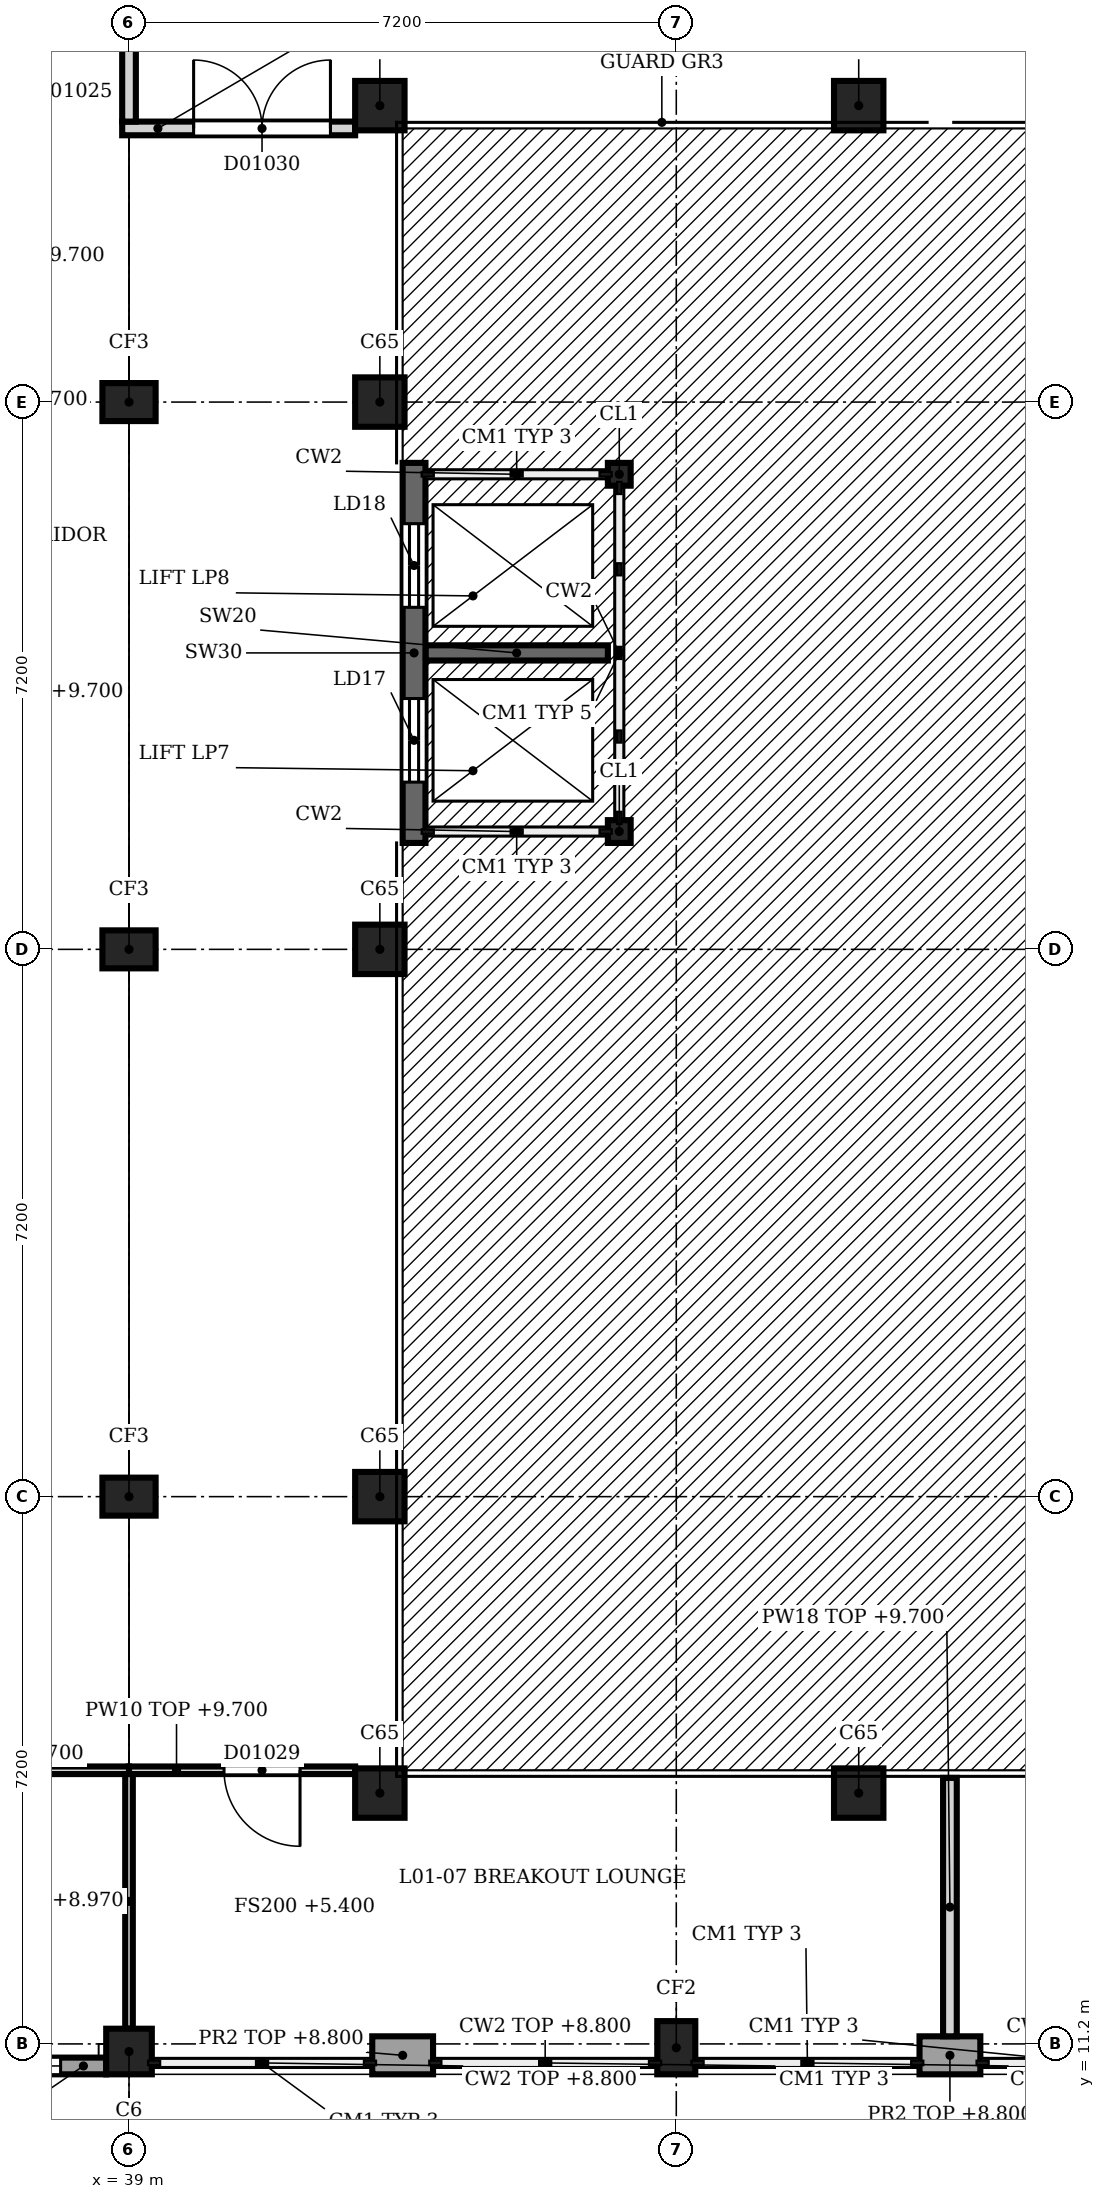
"""IFC4 building model, lengths in metres.
Left out: names, types, materials, properties, quantities, classifications, styles, units other than length and angle.
Written with IfcOpenShell. Run it as: python <this file> out.ifc"""

import sys

from ifc_helpers import new_model, si_unit, direction, frame, frame_2d, origin, origin_2d, place, context, subcontext, project, spatial, rectangle, extrude, element, fill, save


model = new_model("IFC4")
c1 = context("Model", 3, precision=1e-05, world=origin(), true_north=direction((0.0, 1.0)))
c2 = subcontext(c1, "Body", "Model", "MODEL_VIEW")
j1 = project(units=[si_unit("LENGTHUNIT", "METRE"), si_unit("PLANEANGLEUNIT", "RADIAN")], contexts=[c1])
p1 = place(None, origin())
s1 = spatial("IfcSite", under=j1, at=p1, CompositionType="ELEMENT")
p2 = place(p1, origin())
s2 = spatial("IfcBuilding", under=s1, at=p2, CompositionType="ELEMENT")
p3 = place(p2, frame((0.0, 0.0, 5.4)))
s3 = spatial("IfcBuildingStorey", under=s2, at=p3, CompositionType="ELEMENT", Elevation=5.4)
p4 = place(p3, frame((39.0, 11.1, 0.0), z_axis=(0.0, 0.0, 1.0), x_axis=(1.0, 0.0, 0.0)))
e1 = element("IfcColumn", 1, at=p4, inside=s3, PredefinedType="COLUMN", context=c2, shape_type="SweptSolid", body=[
    extrude(rectangle(XDim=0.6, YDim=0.6, at=origin_2d()), origin(), (0.0, 0.0, 1.0), 4.5),
])
for number, where, z_axis, x_axis in (
    (2, (39.0, 18.4, 0.0), (0.0, 0.0, 1.0), (1.0, 0.0, 0.0)),
    (3, (39.0, 25.6, 0.0), (0.0, 0.0, 1.0), (1.0, 0.0, 0.0)),
    (4, (39.0, 32.8, 0.0), (0.0, 0.0, 1.0), (1.0, 0.0, 0.0)),
):
    element("IfcColumn", number, at=place(p3, frame(where, z_axis=z_axis, x_axis=x_axis)), inside=s3, PredefinedType="COLUMN", context=c2, shape_type="SweptSolid", body=[
        extrude(rectangle(XDim=0.7, YDim=0.5, at=origin_2d()), origin(), (0.0, 0.0, 1.0), 4.5),
    ])
p5 = place(p3, frame((46.2, 11.15, 0.0), z_axis=(0.0, 0.0, 1.0), x_axis=(1.0, 0.0, 0.0)))
e5 = element("IfcColumn", 5, at=p5, inside=s3, PredefinedType="COLUMN", context=c2, shape_type="SweptSolid", body=[
    extrude(rectangle(XDim=0.5, YDim=0.7, at=origin_2d()), origin(), (0.0, 0.0, 1.0), 4.5),
])
for number, where, z_axis, x_axis in (
    (6, (42.3, 14.5, 0.0), (0.0, 0.0, 1.0), (1.0, 0.0, 0.0)),
    (7, (42.3, 18.4, 0.0), (0.0, 0.0, 1.0), (1.0, 0.0, 0.0)),
    (8, (42.3, 25.6, 0.0), (0.0, 0.0, 1.0), (1.0, 0.0, 0.0)),
    (9, (42.3, 32.8, 0.0), (0.0, 0.0, 1.0), (1.0, 0.0, 0.0)),
    (10, (42.3, 36.7, 0.0), (0.0, 0.0, 1.0), (1.0, 0.0, 0.0)),
    (11, (48.6, 14.5, 0.0), (0.0, 0.0, 1.0), (1.0, 0.0, 0.0)),
    (12, (48.6, 36.7, 0.0), (0.0, 0.0, 1.0), (1.0, 0.0, 0.0)),
):
    element("IfcColumn", number, at=place(p3, frame(where, z_axis=z_axis, x_axis=x_axis)), inside=s3, PredefinedType="COLUMN", context=c2, shape_type="SweptSolid", body=[
        extrude(rectangle(XDim=0.65, YDim=0.65, at=origin_2d()), origin(), (0.0, 0.0, 1.0), 4.5),
    ])
for number, where, z_axis, x_axis in (
    (13, (50.2, 11.05, 0.0), (0.0, 0.0, 1.0), (-1.0, 0.0, 0.0)),
    (14, (43.0, 11.05, 0.0), (0.0, 0.0, 1.0), (-1.0, 0.0, 0.0)),
):
    element("IfcWall", number, at=place(p3, frame(where, z_axis=z_axis, x_axis=x_axis)), inside=s3, PredefinedType="SOLIDWALL", context=c2, shape_type="SweptSolid", body=[
        extrude(rectangle(XDim=0.8, YDim=0.5, at=frame_2d((0.4, 0.0))), origin(), (0.0, 0.0, 1.0), 3.4),
    ])
p6 = place(p3, frame((38.7, 10.91, 0.0), z_axis=(0.0, 0.0, 1.0), x_axis=(-1.0, 0.0, 0.0)))
e15 = element("IfcWall", 15, at=p6, inside=s3, PredefinedType="SOLIDWALL", context=c2, shape_type="SweptSolid", body=[
    extrude(rectangle(XDim=2.9, YDim=0.22, at=frame_2d((1.45, 0.0))), origin(), (0.0, 0.0, 1.0), 3.4),
])
p7 = place(p6, frame((0.6, 0.0, 0.9)))
e16 = element("IfcOpeningElement", 16, at=p7, cuts=e15, PredefinedType="OPENING", context=c2, shape_type="SweptSolid", body=[
    extrude(rectangle(XDim=1.8, YDim=2.4, at=frame_2d((0.9, 1.2))), frame((0.0, 0.12, 0.0), z_axis=(0.0, -1.0, 0.0), x_axis=(1.0, 0.0, 0.0)), (0.0, 0.0, 1.0), 0.24),
])
p8 = place(p3, frame((35.4, 14.8, 0.0), z_axis=(0.0, 0.0, 1.0), x_axis=(1.0, 0.0, 0.0)))
e17 = element("IfcWall", 17, at=p8, inside=s3, PredefinedType="PARTITIONING", context=c2, shape_type="SweptSolid", body=[
    extrude(rectangle(XDim=3.6, YDim=0.1, at=frame_2d((1.8, 0.0))), origin(), (0.0, 0.0, 1.0), 4.3),
])
p9 = place(p3, frame((41.975, 14.8, 0.0), z_axis=(0.0, 0.0, 1.0), x_axis=(-1.0, 0.0, 0.0)))
e18 = element("IfcWall", 18, at=p9, inside=s3, PredefinedType="PARTITIONING", context=c2, shape_type="SweptSolid", body=[
    extrude(rectangle(XDim=2.975, YDim=0.1, at=frame_2d((1.488, 0.0))), origin(), (0.0, 0.0, 1.0), 4.3),
])
p10 = place(p9, frame((0.725, 0.0, 0.0)))
e19 = element("IfcOpeningElement", 19, at=p10, cuts=e18, PredefinedType="OPENING", context=c2, shape_type="SweptSolid", body=[
    extrude(rectangle(XDim=1.0, YDim=2.1, at=frame_2d((0.5, 1.05))), frame((0.0, 0.06, 0.0), z_axis=(0.0, -1.0, 0.0), x_axis=(1.0, 0.0, 0.0)), (0.0, 0.0, 1.0), 0.12),
])
p11 = place(p3, frame((41.975, 36.4, 0.0), z_axis=(0.0, 0.0, 1.0), x_axis=(-1.0, 0.0, 0.0)))
e20 = element("IfcWall", 20, at=p11, inside=s3, PredefinedType="PARTITIONING", context=c2, shape_type="SweptSolid", body=[
    extrude(rectangle(XDim=3.065, YDim=0.18, at=frame_2d((1.533, 0.0))), origin(), (0.0, 0.0, 1.0), 4.3),
])
p12 = place(p11, frame((0.325, 0.0, 0.0)))
e21 = element("IfcOpeningElement", 21, at=p12, cuts=e20, PredefinedType="OPENING", context=c2, shape_type="SweptSolid", body=[
    extrude(rectangle(XDim=1.8, YDim=2.1, at=frame_2d((0.9, 1.05))), frame((0.0, 0.1, 0.0), z_axis=(0.0, -1.0, 0.0), x_axis=(1.0, 0.0, 0.0)), (0.0, 0.0, 1.0), 0.2),
])
p13 = place(p3, frame((39.0, 11.4, 0.0), z_axis=(0.0, 0.0, 1.0), x_axis=(0.0, 1.0, 0.0)))
e22 = element("IfcWall", 22, at=p13, inside=s3, PredefinedType="PARTITIONING", context=c2, shape_type="SweptSolid", body=[
    extrude(rectangle(XDim=3.35, YDim=0.1, at=frame_2d((1.675, 0.0))), origin(), (0.0, 0.0, 1.0), 3.57),
])
p14 = place(p3, frame((39.0, 36.49, 0.0), z_axis=(0.0, 0.0, 1.0), x_axis=(0.0, 1.0, 0.0)))
e23 = element("IfcWall", 23, at=p14, inside=s3, PredefinedType="PARTITIONING", context=c2, shape_type="SweptSolid", body=[
    extrude(rectangle(XDim=3.31, YDim=0.18, at=frame_2d((1.655, 0.0))), origin(), (0.0, 0.0, 1.0), 3.57),
])
p15 = place(p3, frame((49.8, 11.3, 0.0), z_axis=(0.0, 0.0, 1.0), x_axis=(0.0, 1.0, 0.0)))
e24 = element("IfcWall", 24, at=p15, inside=s3, PredefinedType="PARTITIONING", context=c2, shape_type="SweptSolid", body=[
    extrude(rectangle(XDim=3.4, YDim=0.18, at=frame_2d((1.7, 0.0))), origin(), (0.0, 0.0, 1.0), 4.3),
])
p16 = place(p3, frame((42.75, 27.0, 0.0), z_axis=(0.0, 0.0, 1.0), x_axis=(0.0, 1.0, 0.0)))
e25 = element("IfcWall", 25, at=p16, inside=s3, PredefinedType="SHEAR", context=c2, shape_type="SweptSolid", body=[
    extrude(rectangle(XDim=5.0, YDim=0.3, at=frame_2d((2.5, 0.0))), origin(), (0.0, 0.0, 1.0), 4.5),
])
p17 = place(p16, frame((0.8, 0.0, 0.0)))
e26 = element("IfcOpeningElement", 26, at=p17, cuts=e25, PredefinedType="OPENING", context=c2, shape_type="SweptSolid", body=[
    extrude(rectangle(XDim=1.1, YDim=2.1, at=frame_2d((0.55, 1.05))), frame((0.0, 0.16, 0.0), z_axis=(0.0, -1.0, 0.0), x_axis=(1.0, 0.0, 0.0)), (0.0, 0.0, 1.0), 0.32),
])
p18 = place(p16, frame((3.1, 0.0, 0.0)))
e27 = element("IfcOpeningElement", 27, at=p18, cuts=e25, PredefinedType="OPENING", context=c2, shape_type="SweptSolid", body=[
    extrude(rectangle(XDim=1.1, YDim=2.1, at=frame_2d((0.55, 1.05))), frame((0.0, 0.16, 0.0), z_axis=(0.0, -1.0, 0.0), x_axis=(1.0, 0.0, 0.0)), (0.0, 0.0, 1.0), 0.32),
])
p19 = place(p3, frame((42.9, 29.5, 0.0), z_axis=(0.0, 0.0, 1.0), x_axis=(1.0, 0.0, 0.0)))
e28 = element("IfcWall", 28, at=p19, inside=s3, PredefinedType="SHEAR", context=c2, shape_type="SweptSolid", body=[
    extrude(rectangle(XDim=2.4, YDim=0.2, at=frame_2d((1.2, 0.0))), origin(), (0.0, 0.0, 1.0), 4.5),
])
for number, where, z_axis, x_axis in (
    (29, (45.45, 27.15, 0.0), (0.0, 0.0, 1.0), (1.0, 0.0, 0.0)),
    (30, (45.45, 31.85, 0.0), (0.0, 0.0, 1.0), (1.0, 0.0, 0.0)),
):
    element("IfcColumn", number, at=place(p3, frame(where, z_axis=z_axis, x_axis=x_axis)), inside=s3, PredefinedType="COLUMN", context=c2, shape_type="SweptSolid", body=[
        extrude(rectangle(XDim=0.3, YDim=0.3, at=origin_2d()), origin(), (0.0, 0.0, 1.0), 4.5),
    ])
p20 = place(p7, origin())
e31 = element("IfcWindow", 31, at=p20, inside=s3, PartitioningType="SINGLE_PANEL", PredefinedType="WINDOW", context=c2, shape_type="SweptSolid", body=[
    extrude(rectangle(XDim=1.8, YDim=2.4, at=frame_2d((0.9, 1.2))), frame((0.0, 0.03, 0.0), z_axis=(0.0, -1.0, 0.0), x_axis=(1.0, 0.0, 0.0)), (0.0, 0.0, 1.0), 0.06),
])
fill(e16, e31)
p21 = place(p10, origin())
e32 = element("IfcDoor", 32, at=p21, inside=s3, OperationType="SINGLE_SWING_LEFT", PredefinedType="DOOR", context=c2, shape_type="SweptSolid", body=[
    extrude(rectangle(XDim=1.0, YDim=2.1, at=frame_2d((0.5, 1.05))), frame((0.0, 0.025, 0.0), z_axis=(0.0, -1.0, 0.0), x_axis=(1.0, 0.0, 0.0)), (0.0, 0.0, 1.0), 0.05),
])
fill(e19, e32)
p22 = place(p12, origin())
e33 = element("IfcDoor", 33, at=p22, inside=s3, OperationType="SINGLE_SWING_LEFT", PredefinedType="DOOR", context=c2, shape_type="SweptSolid", body=[
    extrude(rectangle(XDim=1.8, YDim=2.1, at=frame_2d((0.9, 1.05))), frame((0.0, 0.025, 0.0), z_axis=(0.0, -1.0, 0.0), x_axis=(1.0, 0.0, 0.0)), (0.0, 0.0, 1.0), 0.05),
])
fill(e21, e33)
p23 = place(p17, origin())
e34 = element("IfcDoor", 34, at=p23, inside=s3, OperationType="DOUBLE_DOOR_SLIDING", PredefinedType="DOOR", context=c2, shape_type="SweptSolid", body=[
    extrude(rectangle(XDim=1.1, YDim=2.1, at=frame_2d((0.55, 1.05))), frame((0.0, 0.025, 0.0), z_axis=(0.0, -1.0, 0.0), x_axis=(1.0, 0.0, 0.0)), (0.0, 0.0, 1.0), 0.05),
])
fill(e26, e34)
p24 = place(p18, origin())
e35 = element("IfcDoor", 35, at=p24, inside=s3, OperationType="DOUBLE_DOOR_SLIDING", PredefinedType="DOOR", context=c2, shape_type="SweptSolid", body=[
    extrude(rectangle(XDim=1.1, YDim=2.1, at=frame_2d((0.55, 1.05))), frame((0.0, 0.025, 0.0), z_axis=(0.0, -1.0, 0.0), x_axis=(1.0, 0.0, 0.0)), (0.0, 0.0, 1.0), 0.05),
])
fill(e27, e35)
save(model, sys.argv[1])
